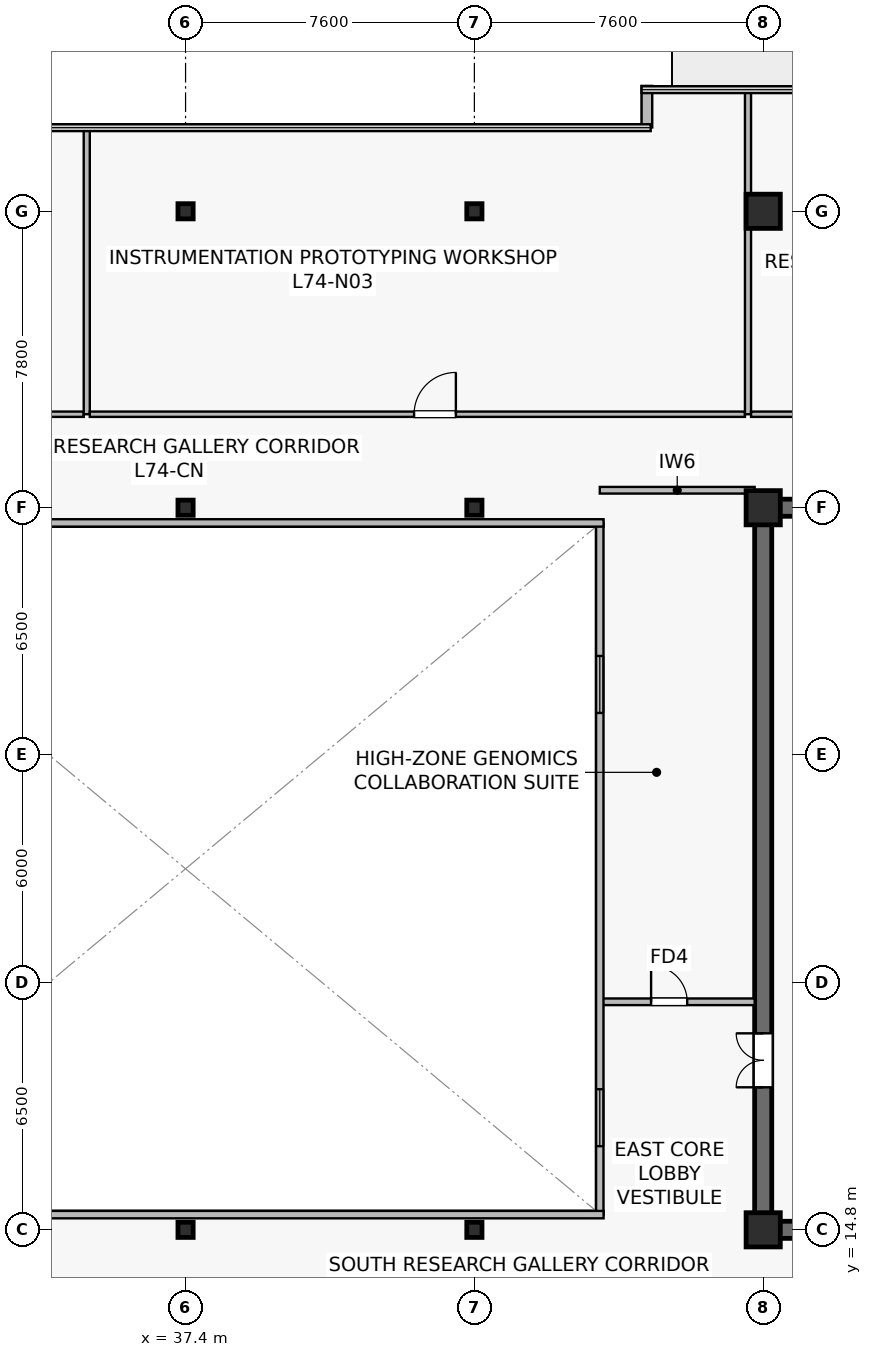
"""IFC4 building model, lengths in metres.
Left out: names, types, materials, properties, quantities, classifications, styles, units other than length and angle.
Written with IfcOpenShell. Run it as: python <this file> out.ifc"""

import sys

from ifc_helpers import new_model, si_unit, direction, frame, frame_2d, origin, origin_2d, place, context, subcontext, project, spatial, rectangle, i_section, extrude, source, transform, mapped, element, fill, save


model = new_model("IFC4")
c1 = context("Model", 3, precision=1e-05, world=origin(), true_north=direction((0.0, 1.0)))
c2 = subcontext(c1, "Body", "Model", "MODEL_VIEW")
j1 = project(units=[si_unit("LENGTHUNIT", "METRE"), si_unit("PLANEANGLEUNIT", "RADIAN")], contexts=[c1])
p1 = place(None, origin())
s1 = spatial("IfcSite", under=j1, at=p1, CompositionType="ELEMENT")
p2 = place(p1, origin())
s2 = spatial("IfcBuilding", under=s1, at=p2, CompositionType="ELEMENT")
p3 = place(p2, frame((0.0, 0.0, 310.2)))
s3 = spatial("IfcBuildingStorey", under=s2, at=p3, CompositionType="ELEMENT", Elevation=310.2)
p4 = place(p3, frame((52.375, 14.8, 0.0), z_axis=(0.0, 0.0, 1.0), x_axis=(1.0, 0.0, 0.0)))
e1 = element("IfcWall", 1, at=p4, inside=s3, PredefinedType="SHEAR", context=c2, shape_type="SweptSolid", body=[
    extrude(rectangle(XDim=15.25, YDim=0.45, at=frame_2d((7.625, 0.0))), origin(), (0.0, 0.0, 1.0), 3.9),
])
p5 = place(p3, frame((52.375, 33.8, 0.0), z_axis=(0.0, 0.0, 1.0), x_axis=(1.0, 0.0, 0.0)))
e2 = element("IfcWall", 2, at=p5, inside=s3, PredefinedType="SHEAR", context=c2, shape_type="SweptSolid", body=[
    extrude(rectangle(XDim=15.25, YDim=0.45, at=frame_2d((7.625, 0.0))), origin(), (0.0, 0.0, 1.0), 3.9),
])
p6 = place(p5, frame((8.725, 0.0, 0.0)))
e3 = element("IfcOpeningElement", 3, at=p6, cuts=e2, PredefinedType="OPENING", context=c2, shape_type="SweptSolid", body=[
    extrude(rectangle(XDim=0.95, YDim=2.15, at=frame_2d((0.475, 1.075))), frame((0.0, 0.235, 0.0), z_axis=(0.0, -1.0, 0.0), x_axis=(1.0, 0.0, 0.0)), (0.0, 0.0, 1.0), 0.47),
])
p7 = place(p5, frame((5.36, 0.0, 0.0)))
e4 = element("IfcOpeningElement", 4, at=p7, cuts=e2, PredefinedType="OPENING", context=c2, shape_type="SweptSolid", body=[
    extrude(rectangle(XDim=0.95, YDim=2.15, at=frame_2d((0.475, 1.075))), frame((0.0, 0.235, 0.0), z_axis=(0.0, -1.0, 0.0), x_axis=(1.0, 0.0, 0.0)), (0.0, 0.0, 1.0), 0.47),
])
p8 = place(p5, frame((1.96, 0.0, 0.0)))
e5 = element("IfcOpeningElement", 5, at=p8, cuts=e2, PredefinedType="OPENING", context=c2, shape_type="SweptSolid", body=[
    extrude(rectangle(XDim=0.95, YDim=2.15, at=frame_2d((0.475, 1.075))), frame((0.0, 0.235, 0.0), z_axis=(0.0, -1.0, 0.0), x_axis=(1.0, 0.0, 0.0)), (0.0, 0.0, 1.0), 0.47),
])
p9 = place(p3, frame((52.6, 15.025, 0.0), z_axis=(0.0, 0.0, 1.0), x_axis=(0.0, 1.0, 0.0)))
e6 = element("IfcWall", 6, at=p9, inside=s3, PredefinedType="SHEAR", context=c2, shape_type="SweptSolid", body=[
    extrude(rectangle(XDim=18.55, YDim=0.45, at=frame_2d((9.275, 0.0))), origin(), (0.0, 0.0, 1.0), 3.9),
])
p10 = place(p9, frame((3.525, 0.0, 0.0)))
e7 = element("IfcOpeningElement", 7, at=p10, cuts=e6, PredefinedType="OPENING", context=c2, shape_type="SweptSolid", body=[
    extrude(rectangle(XDim=1.42, YDim=2.2, at=frame_2d((0.71, 1.1))), frame((0.0, 0.235, 0.0), z_axis=(0.0, -1.0, 0.0), x_axis=(1.0, 0.0, 0.0)), (0.0, 0.0, 1.0), 0.47),
])
m1 = source(origin(), c2, "Body", "SweptSolid", [
    extrude(rectangle(XDim=0.9, YDim=0.9, at=origin_2d()), origin(), (0.0, 0.0, 1.0), 4.2),
])
for number, where, z_axis, x_axis in (
    (8, (52.6, 14.8, 0.0), (0.0, 0.0, 1.0), (1.0, 0.0, 0.0)),
    (9, (52.6, 33.8, 0.0), (0.0, 0.0, 1.0), (1.0, 0.0, 0.0)),
    (10, (52.6, 41.6, 0.0), (0.0, 0.0, 1.0), (1.0, 0.0, 0.0)),
):
    element("IfcColumn", number, at=place(p3, frame(where, z_axis=z_axis, x_axis=x_axis)), inside=s3, PredefinedType="COLUMN", context=c2, shape_type="MappedRepresentation", body=[
        mapped(m1, transform((0.0, 0.0, 0.0), scale=1.0)),
    ])
m2 = source(origin(), c2, "Body", "SweptSolid", [
    extrude(i_section(OverallWidth=0.4, OverallDepth=0.4, WebThickness=0.021, FlangeThickness=0.021, at=origin_2d()), origin(), (0.0, 0.0, 1.0), 4.2),
])
for number, where, z_axis, x_axis in (
    (11, (37.4, 14.8, 0.0), (0.0, 0.0, 1.0), (1.0, 0.0, 0.0)),
    (12, (37.4, 33.8, 0.0), (0.0, 0.0, 1.0), (1.0, 0.0, 0.0)),
    (13, (37.4, 41.6, 0.0), (0.0, 0.0, 1.0), (1.0, 0.0, 0.0)),
    (14, (45.0, 14.8, 0.0), (0.0, 0.0, 1.0), (1.0, 0.0, 0.0)),
    (15, (45.0, 33.8, 0.0), (0.0, 0.0, 1.0), (1.0, 0.0, 0.0)),
    (16, (45.0, 41.6, 0.0), (0.0, 0.0, 1.0), (1.0, 0.0, 0.0)),
):
    element("IfcColumn", number, at=place(p3, frame(where, z_axis=z_axis, x_axis=x_axis)), inside=s3, PredefinedType="COLUMN", context=c2, shape_type="MappedRepresentation", body=[
        mapped(m2, transform((0.0, 0.0, 0.0), scale=1.0)),
    ])
p11 = place(p3, frame((49.54, 44.9, 0.0), z_axis=(0.0, 0.0, 1.0), x_axis=(0.0, -1.0, 0.0)))
e17 = element("IfcWall", 17, at=p11, inside=s3, PredefinedType="STANDARD", context=c2, shape_type="SweptSolid", body=[
    extrude(rectangle(XDim=1.093, YDim=0.28, at=frame_2d((0.546, 0.0))), origin(), (0.0, 0.0, 1.0), 3.9),
])
p12 = place(p3, frame((48.3, 34.26, 0.0), z_axis=(0.0, 0.0, 1.0), x_axis=(1.0, 0.0, 0.0)))
e18 = element("IfcWall", 18, at=p12, inside=s3, PredefinedType="PARTITIONING", context=c2, shape_type="SweptSolid", body=[
    extrude(rectangle(XDim=4.075, YDim=0.175, at=frame_2d((2.038, 0.0))), origin(), (0.0, 0.0, 1.0), 3.635),
])
p13 = place(p3, frame((48.3, 20.8, 0.0), z_axis=(0.0, 0.0, 1.0), x_axis=(1.0, 0.0, 0.0)))
e19 = element("IfcWall", 19, at=p13, inside=s3, PredefinedType="PARTITIONING", context=c2, shape_type="SweptSolid", body=[
    extrude(rectangle(XDim=4.075, YDim=0.175, at=frame_2d((2.038, 0.0))), origin(), (0.0, 0.0, 1.0), 3.9),
])
p14 = place(p13, frame((1.35, 0.0, 0.0)))
e20 = element("IfcOpeningElement", 20, at=p14, cuts=e19, PredefinedType="OPENING", context=c2, shape_type="SweptSolid", body=[
    extrude(rectangle(XDim=0.95, YDim=2.15, at=frame_2d((0.475, 1.075))), frame((0.0, 0.098, 0.0), z_axis=(0.0, -1.0, 0.0), x_axis=(1.0, 0.0, 0.0)), (0.0, 0.0, 1.0), 0.195),
])
p15 = place(p3, frame((48.3, 15.2, 0.0), z_axis=(0.0, 0.0, 1.0), x_axis=(0.0, 1.0, 0.0)))
e21 = element("IfcWall", 21, at=p15, inside=s3, PredefinedType="SOLIDWALL", context=c2, shape_type="SweptSolid", body=[
    extrude(rectangle(XDim=18.2, YDim=0.195, at=frame_2d((9.1, 0.0))), origin(), (0.0, 0.0, 1.0), 3.9),
])
p16 = place(p15, frame((1.8, 0.0, 0.9)))
e22 = element("IfcOpeningElement", 22, at=p16, cuts=e21, PredefinedType="OPENING", context=c2, shape_type="SweptSolid", body=[
    extrude(rectangle(XDim=1.5, YDim=1.4, at=frame_2d((0.75, 0.7))), frame((0.0, 0.107, 0.0), z_axis=(0.0, -1.0, 0.0), x_axis=(1.0, 0.0, 0.0)), (0.0, 0.0, 1.0), 0.215),
])
p17 = place(p15, frame((13.2, 0.0, 0.9)))
e23 = element("IfcOpeningElement", 23, at=p17, cuts=e21, PredefinedType="OPENING", context=c2, shape_type="SweptSolid", body=[
    extrude(rectangle(XDim=1.5, YDim=1.4, at=frame_2d((0.75, 0.7))), frame((0.0, 0.107, 0.0), z_axis=(0.0, -1.0, 0.0), x_axis=(1.0, 0.0, 0.0)), (0.0, 0.0, 1.0), 0.215),
])
for number, where, z_axis, x_axis in (
    (24, (26.4, 15.2, 0.0), (0.0, 0.0, 1.0), (1.0, 0.0, 0.0)),
    (25, (26.4, 33.4, 0.0), (0.0, 0.0, 1.0), (1.0, 0.0, 0.0)),
):
    element("IfcWall", number, at=place(p3, frame(where, z_axis=z_axis, x_axis=x_axis)), inside=s3, PredefinedType="SOLIDWALL", context=c2, shape_type="SweptSolid", body=[
        extrude(rectangle(XDim=22.0, YDim=0.195, at=frame_2d((11.0, 0.0))), origin(), (0.0, 0.0, 1.0), 3.9),
    ])
p18 = place(p3, frame((17.48, 36.26, 0.0), z_axis=(0.0, 0.0, 1.0), x_axis=(1.0, 0.0, 0.0)))
e26 = element("IfcWall", 26, at=p18, inside=s3, PredefinedType="PARTITIONING", context=c2, shape_type="SweptSolid", body=[
    extrude(rectangle(XDim=17.24, YDim=0.14, at=frame_2d((8.62, 0.0))), origin(), (0.0, 0.0, 1.0), 3.297),
])
p19 = place(p18, frame((6.68, 0.0, 0.0)))
e27 = element("IfcOpeningElement", 27, at=p19, cuts=e26, PredefinedType="OPENING", context=c2, shape_type="SweptSolid", body=[
    extrude(rectangle(XDim=1.1, YDim=2.18, at=frame_2d((0.55, 1.09))), frame((0.0, 0.08, 0.0), z_axis=(0.0, -1.0, 0.0), x_axis=(1.0, 0.0, 0.0)), (0.0, 0.0, 1.0), 0.16),
])
p20 = place(p3, frame((34.8, 36.26, 0.0), z_axis=(0.0, 0.0, 1.0), x_axis=(0.0, 1.0, 0.0)))
e28 = element("IfcWall", 28, at=p20, inside=s3, PredefinedType="PARTITIONING", context=c2, shape_type="SweptSolid", body=[
    extrude(rectangle(XDim=7.53, YDim=0.16, at=frame_2d((3.765, 0.0))), origin(), (0.0, 0.0, 1.0), 2.985),
])
p21 = place(p3, frame((34.88, 36.26, 0.0), z_axis=(0.0, 0.0, 1.0), x_axis=(1.0, 0.0, 0.0)))
e29 = element("IfcWall", 29, at=p21, inside=s3, PredefinedType="PARTITIONING", context=c2, shape_type="SweptSolid", body=[
    extrude(rectangle(XDim=17.24, YDim=0.14, at=frame_2d((8.62, 0.0))), origin(), (0.0, 0.0, 1.0), 3.297),
])
p22 = place(p21, frame((8.533, 0.0, 0.0)))
e30 = element("IfcOpeningElement", 30, at=p22, cuts=e29, PredefinedType="OPENING", context=c2, shape_type="SweptSolid", body=[
    extrude(rectangle(XDim=1.1, YDim=2.18, at=frame_2d((0.55, 1.09))), frame((0.0, 0.08, 0.0), z_axis=(0.0, -1.0, 0.0), x_axis=(1.0, 0.0, 0.0)), (0.0, 0.0, 1.0), 0.16),
])
p23 = place(p3, frame((52.2, 36.26, 0.0), z_axis=(0.0, 0.0, 1.0), x_axis=(0.0, 1.0, 0.0)))
e31 = element("IfcWall", 31, at=p23, inside=s3, PredefinedType="PARTITIONING", context=c2, shape_type="SweptSolid", body=[
    extrude(rectangle(XDim=8.53, YDim=0.16, at=frame_2d((4.265, 0.0))), origin(), (0.0, 0.0, 1.0), 2.985),
])
p24 = place(p3, frame((52.28, 36.26, 0.0), z_axis=(0.0, 0.0, 1.0), x_axis=(1.0, 0.0, 0.0)))
e32 = element("IfcWall", 32, at=p24, inside=s3, PredefinedType="PARTITIONING", context=c2, shape_type="SweptSolid", body=[
    extrude(rectangle(XDim=16.61, YDim=0.14, at=frame_2d((8.305, 0.0))), origin(), (0.0, 0.0, 1.0), 3.297),
])
p25 = place(p24, frame((6.422, 0.0, 0.0)))
e33 = element("IfcOpeningElement", 33, at=p25, cuts=e32, PredefinedType="OPENING", context=c2, shape_type="SweptSolid", body=[
    extrude(rectangle(XDim=1.1, YDim=2.18, at=frame_2d((0.55, 1.09))), frame((0.0, 0.08, 0.0), z_axis=(0.0, -1.0, 0.0), x_axis=(1.0, 0.0, 0.0)), (0.0, 0.0, 1.0), 0.16),
])
m3 = source(origin(), c2, "Body", "SweptSolid", [
    extrude(rectangle(XDim=1.5, YDim=1.4, at=frame_2d((0.75, 0.7))), frame((0.0, 0.03, 0.0), z_axis=(0.0, -1.0, 0.0), x_axis=(1.0, 0.0, 0.0)), (0.0, 0.0, 1.0), 0.06),
])
p26 = place(p16, origin())
e34 = element("IfcWindow", 34, at=p26, inside=s3, PartitioningType="SINGLE_PANEL", PredefinedType="WINDOW", context=c2, shape_type="MappedRepresentation", body=[
    mapped(m3, transform((0.0, 0.0, 0.0), scale=1.0)),
])
fill(e22, e34)
p27 = place(p17, origin())
e35 = element("IfcWindow", 35, at=p27, inside=s3, PartitioningType="SINGLE_PANEL", PredefinedType="WINDOW", context=c2, shape_type="MappedRepresentation", body=[
    mapped(m3, transform((0.0, 0.0, 0.0), scale=1.0)),
])
fill(e23, e35)
m4 = source(origin(), c2, "Body", "SweptSolid", [
    extrude(rectangle(XDim=1.42, YDim=2.2, at=frame_2d((0.71, 1.1))), frame((0.0, 0.025, 0.0), z_axis=(0.0, -1.0, 0.0), x_axis=(1.0, 0.0, 0.0)), (0.0, 0.0, 1.0), 0.05),
])
p28 = place(p10, origin())
e36 = element("IfcDoor", 36, at=p28, inside=s3, OperationType="DOUBLE_DOOR_SINGLE_SWING", PredefinedType="DOOR", context=c2, shape_type="MappedRepresentation", body=[
    mapped(m4, transform((0.0, 0.0, 0.0), scale=1.0)),
])
fill(e7, e36)
m5 = source(origin(), c2, "Body", "SweptSolid", [
    extrude(rectangle(XDim=0.95, YDim=2.15, at=frame_2d((0.475, 1.075))), frame((0.0, 0.025, 0.0), z_axis=(0.0, -1.0, 0.0), x_axis=(1.0, 0.0, 0.0)), (0.0, 0.0, 1.0), 0.05),
])
p29 = place(p14, origin())
e37 = element("IfcDoor", 37, at=p29, inside=s3, OperationType="SINGLE_SWING_LEFT", PredefinedType="DOOR", context=c2, shape_type="MappedRepresentation", body=[
    mapped(m5, transform((0.0, 0.0, 0.0), scale=1.0)),
])
fill(e20, e37)
m6 = source(origin(), c2, "Body", "SweptSolid", [
    extrude(rectangle(XDim=1.1, YDim=2.18, at=frame_2d((0.55, 1.09))), frame((0.0, 0.025, 0.0), z_axis=(0.0, -1.0, 0.0), x_axis=(1.0, 0.0, 0.0)), (0.0, 0.0, 1.0), 0.05),
])
p30 = place(p22, origin())
e38 = element("IfcDoor", 38, at=p30, inside=s3, OperationType="SINGLE_SWING_RIGHT", PredefinedType="DOOR", context=c2, shape_type="MappedRepresentation", body=[
    mapped(m6, transform((0.0, 0.0, 0.0), scale=1.0)),
])
fill(e30, e38)
save(model, sys.argv[1])
